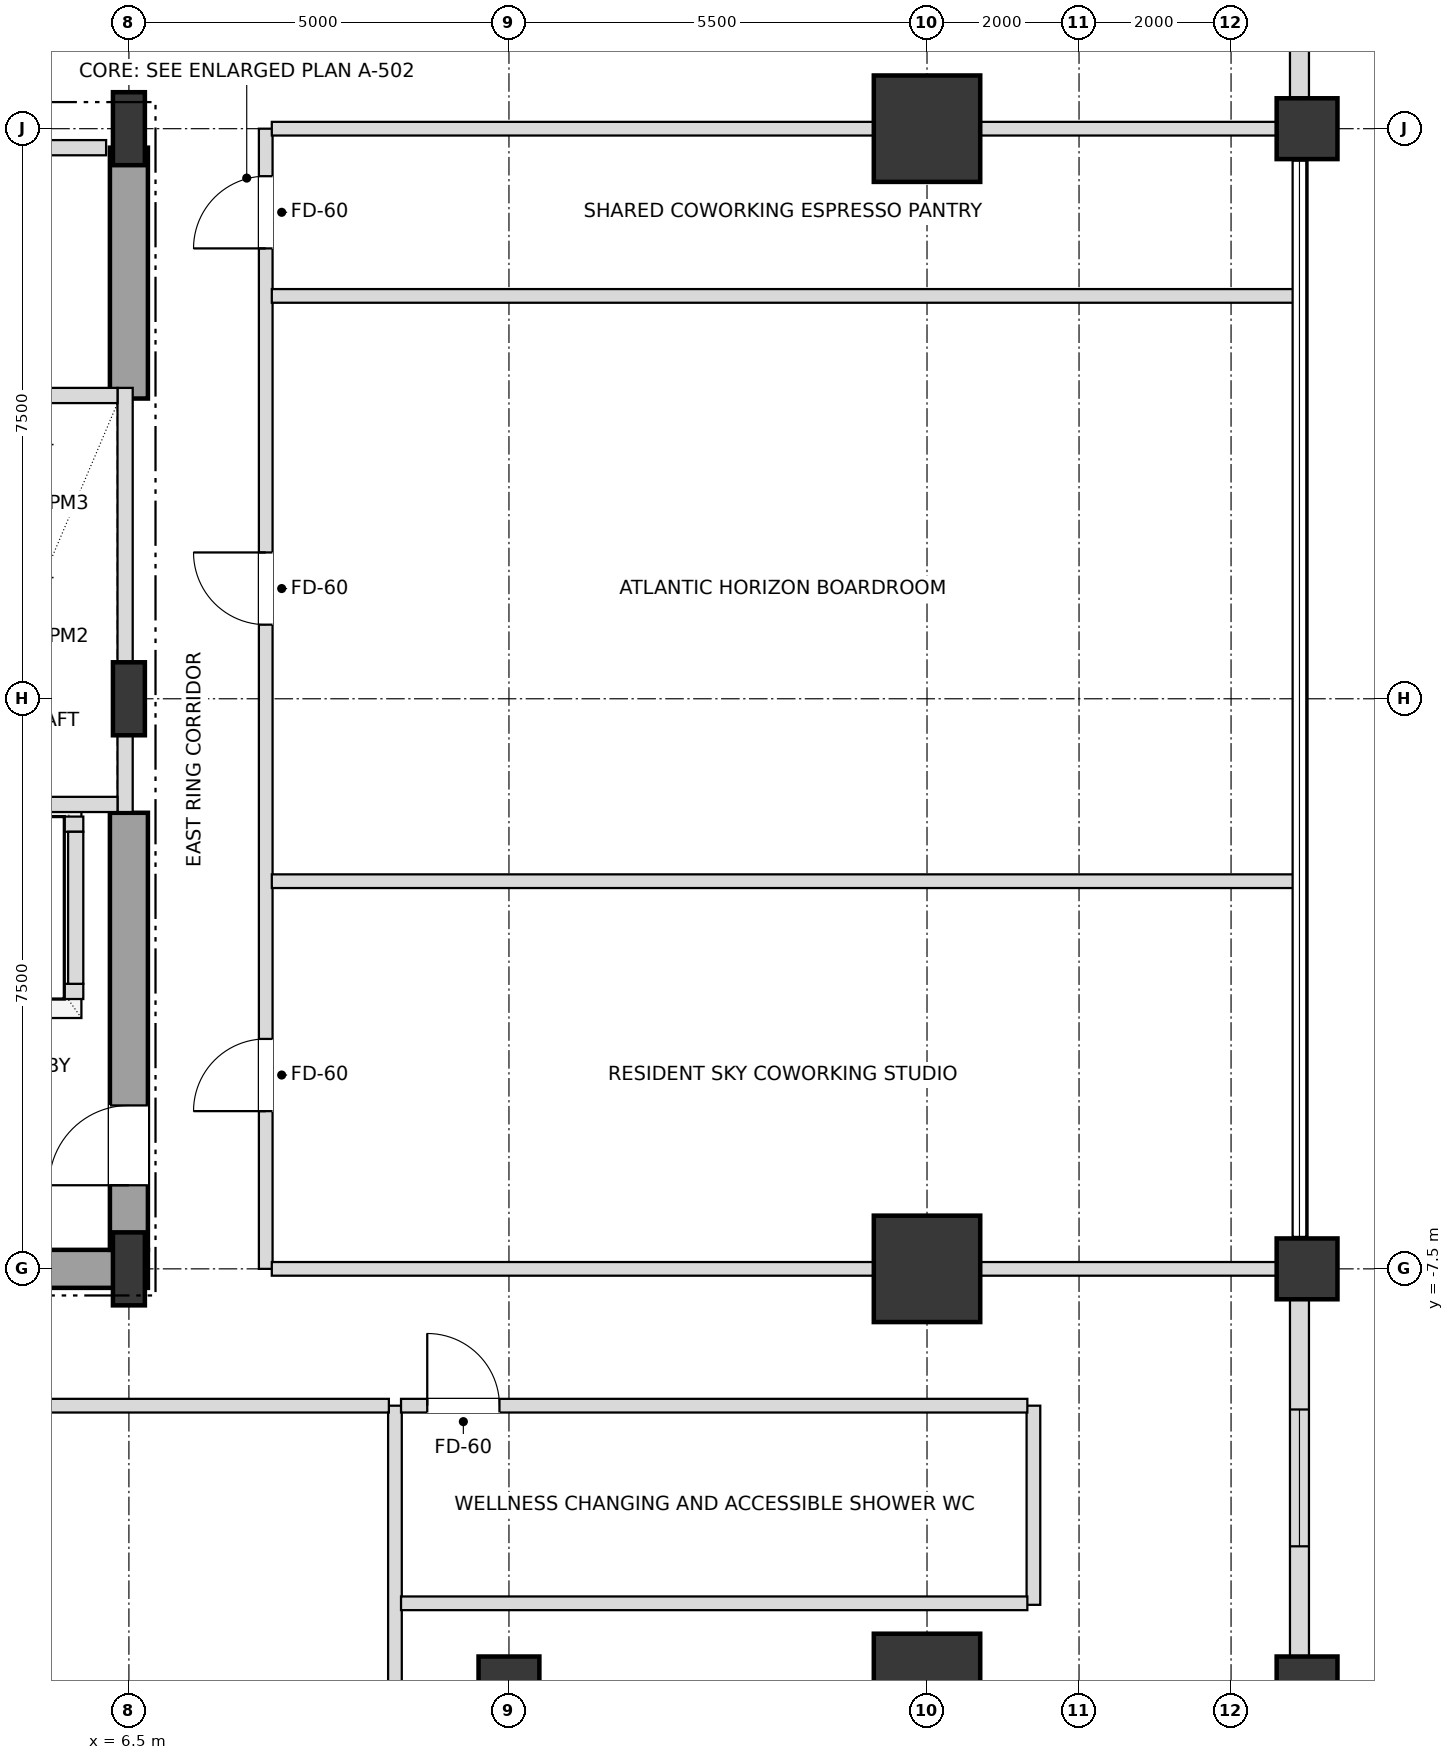
"""IFC4 building model, lengths in metres.
Left out: names, types, materials, properties, quantities, classifications, styles, units other than length and angle.
Written with IfcOpenShell. Run it as: python <this file> out.ifc"""

import sys

from ifc_helpers import new_model, si_unit, direction, frame, frame_2d, origin, origin_2d, place, context, subcontext, project, spatial, rectangle, i_section, extrude, element, fill, save


model = new_model("IFC4")
c1 = context("Model", 3, precision=1e-05, world=origin(), true_north=direction((0.0, 1.0)))
c2 = subcontext(c1, "Body", "Model", "MODEL_VIEW")
j1 = project(units=[si_unit("LENGTHUNIT", "METRE"), si_unit("PLANEANGLEUNIT", "RADIAN")], contexts=[c1])
p1 = place(None, origin())
s1 = spatial("IfcSite", under=j1, at=p1, CompositionType="ELEMENT")
p2 = place(p1, origin())
s2 = spatial("IfcBuilding", under=s1, at=p2, CompositionType="ELEMENT")
p3 = place(p2, frame((0.0, 0.0, 79.2)))
s3 = spatial("IfcBuildingStorey", under=s2, at=p3, CompositionType="ELEMENT", Elevation=79.2)
for number, where, z_axis, x_axis in (
    (1, (6.5, -7.5, 0.0), (0.0, 0.0, 1.0), (1.0, 0.0, 0.0)),
    (2, (6.5, 0.0, 0.0), (0.0, 0.0, 1.0), (1.0, 0.0, 0.0)),
    (3, (6.5, 7.5, 0.0), (0.0, 0.0, 1.0), (1.0, 0.0, 0.0)),
):
    element("IfcColumn", number, at=place(p3, frame(where, z_axis=z_axis, x_axis=x_axis)), inside=s3, PredefinedType="COLUMN", context=c2, shape_type="SweptSolid", body=[
        extrude(i_section(OverallWidth=0.42, OverallDepth=0.96, WebThickness=0.022, FlangeThickness=0.034, at=origin_2d()), origin(), (0.0, 0.0, 1.0), 3.6),
    ])
for number, where, z_axis, x_axis in (
    (4, (17.0, -13.0, 0.0), (0.0, 0.0, 1.0), (1.0, 0.0, 0.0)),
    (5, (17.0, -7.5, 0.0), (0.0, 0.0, 1.0), (1.0, 0.0, 0.0)),
    (6, (17.0, 7.5, 0.0), (0.0, 0.0, 1.0), (1.0, 0.0, 0.0)),
):
    element("IfcColumn", number, at=place(p3, frame(where, z_axis=z_axis, x_axis=x_axis)), inside=s3, PredefinedType="USERDEFINED", context=c2, shape_type="SweptSolid", body=[
        extrude(rectangle(XDim=1.4, YDim=1.4, at=origin_2d()), origin(), (0.0, 0.0, 1.0), 3.6),
    ])
for number, where, z_axis, x_axis in (
    (7, (11.5, -13.0, 0.0), (0.0, 0.0, 1.0), (1.0, 0.0, 0.0)),
    (8, (22.0, -13.0, 0.0), (0.0, 0.0, 1.0), (1.0, 0.0, 0.0)),
    (9, (22.0, -7.5, 0.0), (0.0, 0.0, 1.0), (1.0, 0.0, 0.0)),
    (10, (22.0, 7.5, 0.0), (0.0, 0.0, 1.0), (1.0, 0.0, 0.0)),
):
    element("IfcColumn", number, at=place(p3, frame(where, z_axis=z_axis, x_axis=x_axis)), inside=s3, PredefinedType="COLUMN", context=c2, shape_type="SweptSolid", body=[
        extrude(rectangle(XDim=0.8, YDim=0.8, at=origin_2d()), origin(), (0.0, 0.0, 1.0), 3.6),
    ])
p4 = place(p3, frame((21.9, -12.605, 0.0), z_axis=(0.0, 0.0, 1.0), x_axis=(0.0, 1.0, 0.0)))
e11 = element("IfcWall", 11, at=p4, inside=s3, PredefinedType="SOLIDWALL", context=c2, shape_type="SweptSolid", body=[
    extrude(rectangle(XDim=4.71, YDim=0.25, at=frame_2d((2.355, 0.0))), origin(), (0.0, 0.0, 1.0), 2.736),
])
p5 = place(p4, frame((1.455, 0.0, 0.72)))
e12 = element("IfcOpeningElement", 12, at=p5, cuts=e11, PredefinedType="OPENING", context=c2, shape_type="SweptSolid", body=[
    extrude(rectangle(XDim=1.8, YDim=1.68, at=frame_2d((0.9, 0.84))), frame((0.0, 0.135, 0.0), z_axis=(0.0, -1.0, 0.0), x_axis=(1.0, 0.0, 0.0)), (0.0, 0.0, 1.0), 0.27),
])
p6 = place(p3, frame((21.9, 7.895, 0.0), z_axis=(0.0, 0.0, 1.0), x_axis=(0.0, 1.0, 0.0)))
e13 = element("IfcWall", 13, at=p6, inside=s3, PredefinedType="SOLIDWALL", context=c2, shape_type="SweptSolid", body=[
    extrude(rectangle(XDim=4.71, YDim=0.25, at=frame_2d((2.355, 0.0))), origin(), (0.0, 0.0, 1.0), 2.736),
])
p7 = place(p6, frame((1.455, 0.0, 0.72)))
e14 = element("IfcOpeningElement", 14, at=p7, cuts=e13, PredefinedType="OPENING", context=c2, shape_type="SweptSolid", body=[
    extrude(rectangle(XDim=1.8, YDim=1.68, at=frame_2d((0.9, 0.84))), frame((0.0, 0.135, 0.0), z_axis=(0.0, -1.0, 0.0), x_axis=(1.0, 0.0, 0.0)), (0.0, 0.0, 1.0), 0.27),
])
p8 = place(p3, frame((0.0, -7.5, 0.0), z_axis=(0.0, 0.0, 1.0), x_axis=(1.0, 0.0, 0.0)))
e15 = element("IfcWall", 15, at=p8, inside=s3, PredefinedType="SHEAR", context=c2, shape_type="SweptSolid", body=[
    extrude(rectangle(XDim=6.75, YDim=0.5, at=frame_2d((3.375, 0.0))), origin(), (0.0, 0.0, 1.0), 3.38),
])
p9 = place(p3, frame((6.5, -7.25, 0.0), z_axis=(0.0, 0.0, 1.0), x_axis=(0.0, 1.0, 0.0)))
e16 = element("IfcWall", 16, at=p9, inside=s3, PredefinedType="SHEAR", context=c2, shape_type="SweptSolid", body=[
    extrude(rectangle(XDim=5.75, YDim=0.5, at=frame_2d((2.875, 0.0))), origin(), (0.0, 0.0, 1.0), 3.38),
])
p10 = place(p9, frame((0.85, 0.0, 0.0)))
e17 = element("IfcOpeningElement", 17, at=p10, cuts=e16, PredefinedType="OPENING", context=c2, shape_type="SweptSolid", body=[
    extrude(rectangle(XDim=1.05, YDim=2.15, at=frame_2d((0.525, 1.075))), frame((0.0, 0.26, 0.0), z_axis=(0.0, -1.0, 0.0), x_axis=(1.0, 0.0, 0.0)), (0.0, 0.0, 1.0), 0.52),
])
p11 = place(p3, frame((6.5, 3.95, 0.0), z_axis=(0.0, 0.0, 1.0), x_axis=(0.0, 1.0, 0.0)))
e18 = element("IfcWall", 18, at=p11, inside=s3, PredefinedType="SHEAR", context=c2, shape_type="SweptSolid", body=[
    extrude(rectangle(XDim=3.3, YDim=0.5, at=frame_2d((1.65, 0.0))), origin(), (0.0, 0.0, 1.0), 3.38),
])
p12 = place(p3, frame((6.45, -1.49, 0.0), z_axis=(0.0, 0.0, 1.0), x_axis=(0.0, 1.0, 0.0)))
e19 = element("IfcWall", 19, at=p12, inside=s3, PredefinedType="SOLIDWALL", context=c2, shape_type="SweptSolid", body=[
    extrude(rectangle(XDim=5.58, YDim=0.2, at=frame_2d((2.79, 0.0))), origin(), (0.0, 0.0, 1.0), 2.816),
])
for number, where, z_axis, x_axis in (
    (20, (4.15, -1.39, 0.0), (0.0, 0.0, 1.0), (1.0, 0.0, 0.0)),
    (21, (4.15, 3.99, 0.0), (0.0, 0.0, 1.0), (1.0, 0.0, 0.0)),
):
    element("IfcWall", number, at=place(p3, frame(where, z_axis=z_axis, x_axis=x_axis)), inside=s3, PredefinedType="SOLIDWALL", context=c2, shape_type="SweptSolid", body=[
        extrude(rectangle(XDim=2.2, YDim=0.2, at=frame_2d((1.1, 0.0))), origin(), (0.0, 0.0, 1.0), 3.38),
    ])
p13 = place(p3, frame((1.8, -3.85, 0.0), z_axis=(0.0, 0.0, 1.0), x_axis=(1.0, 0.0, 0.0)))
e22 = element("IfcWall", 22, at=p13, inside=s3, PredefinedType="SOLIDWALL", context=c2, shape_type="SweptSolid", body=[
    extrude(rectangle(XDim=4.1, YDim=0.2, at=frame_2d((2.05, 0.0))), origin(), (0.0, 0.0, 1.0), 3.38),
])
p14 = place(p13, frame((0.45, 0.0, 0.0)))
e23 = element("IfcOpeningElement", 23, at=p14, cuts=e22, PredefinedType="OPENING", context=c2, shape_type="SweptSolid", body=[
    extrude(rectangle(XDim=1.2, YDim=2.2, at=frame_2d((0.6, 1.1))), frame((0.0, 0.11, 0.0), z_axis=(0.0, -1.0, 0.0), x_axis=(1.0, 0.0, 0.0)), (0.0, 0.0, 1.0), 0.22),
])
p15 = place(p13, frame((2.45, 0.0, 0.0)))
e24 = element("IfcOpeningElement", 24, at=p15, cuts=e22, PredefinedType="OPENING", context=c2, shape_type="SweptSolid", body=[
    extrude(rectangle(XDim=1.2, YDim=2.2, at=frame_2d((0.6, 1.1))), frame((0.0, 0.11, 0.0), z_axis=(0.0, -1.0, 0.0), x_axis=(1.0, 0.0, 0.0)), (0.0, 0.0, 1.0), 0.22),
])
p16 = place(p3, frame((1.8, -1.65, 0.0), z_axis=(0.0, 0.0, 1.0), x_axis=(1.0, 0.0, 0.0)))
e25 = element("IfcWall", 25, at=p16, inside=s3, PredefinedType="SOLIDWALL", context=c2, shape_type="SweptSolid", body=[
    extrude(rectangle(XDim=4.1, YDim=0.2, at=frame_2d((2.05, 0.0))), origin(), (0.0, 0.0, 1.0), 3.38),
])
p17 = place(p3, frame((5.8, -3.75, 0.0), z_axis=(0.0, 0.0, 1.0), x_axis=(0.0, 1.0, 0.0)))
e26 = element("IfcWall", 26, at=p17, inside=s3, PredefinedType="SOLIDWALL", context=c2, shape_type="SweptSolid", body=[
    extrude(rectangle(XDim=2.0, YDim=0.2, at=frame_2d((1.0, 0.0))), origin(), (0.0, 0.0, 1.0), 3.38),
])
p18 = place(p3, frame((8.3, -7.5, 0.0), z_axis=(0.0, 0.0, 1.0), x_axis=(0.0, 1.0, 0.0)))
e27 = element("IfcWall", 27, at=p18, inside=s3, PredefinedType="PARTITIONING", context=c2, shape_type="SweptSolid", body=[
    extrude(rectangle(XDim=15.0, YDim=0.18, at=frame_2d((7.5, 0.0))), origin(), (0.0, 0.0, 1.0), 3.38),
])
p19 = place(p18, frame((2.075, 0.0, 0.0)))
e28 = element("IfcOpeningElement", 28, at=p19, cuts=e27, PredefinedType="OPENING", context=c2, shape_type="SweptSolid", body=[
    extrude(rectangle(XDim=0.95, YDim=2.15, at=frame_2d((0.475, 1.075))), frame((0.0, 0.1, 0.0), z_axis=(0.0, -1.0, 0.0), x_axis=(1.0, 0.0, 0.0)), (0.0, 0.0, 1.0), 0.2),
])
p20 = place(p18, frame((8.475, 0.0, 0.0)))
e29 = element("IfcOpeningElement", 29, at=p20, cuts=e27, PredefinedType="OPENING", context=c2, shape_type="SweptSolid", body=[
    extrude(rectangle(XDim=0.95, YDim=2.15, at=frame_2d((0.475, 1.075))), frame((0.0, 0.1, 0.0), z_axis=(0.0, -1.0, 0.0), x_axis=(1.0, 0.0, 0.0)), (0.0, 0.0, 1.0), 0.2),
])
p21 = place(p18, frame((13.425, 0.0, 0.0)))
e30 = element("IfcOpeningElement", 30, at=p21, cuts=e27, PredefinedType="OPENING", context=c2, shape_type="SweptSolid", body=[
    extrude(rectangle(XDim=0.95, YDim=2.15, at=frame_2d((0.475, 1.075))), frame((0.0, 0.1, 0.0), z_axis=(0.0, -1.0, 0.0), x_axis=(1.0, 0.0, 0.0)), (0.0, 0.0, 1.0), 0.2),
])
p22 = place(p3, frame((10.0, -24.9, 0.0), z_axis=(0.0, 0.0, 1.0), x_axis=(0.0, 1.0, 0.0)))
e31 = element("IfcWall", 31, at=p22, inside=s3, PredefinedType="PARTITIONING", context=c2, shape_type="SweptSolid", body=[
    extrude(rectangle(XDim=15.6, YDim=0.18, at=frame_2d((7.8, 0.0))), origin(), (0.0, 0.0, 1.0), 2.816),
])
p23 = place(p22, frame((6.015, 0.0, 0.0)))
e32 = element("IfcOpeningElement", 32, at=p23, cuts=e31, PredefinedType="OPENING", context=c2, shape_type="SweptSolid", body=[
    extrude(rectangle(XDim=0.95, YDim=2.15, at=frame_2d((0.475, 1.075))), frame((0.0, 0.1, 0.0), z_axis=(0.0, -1.0, 0.0), x_axis=(1.0, 0.0, 0.0)), (0.0, 0.0, 1.0), 0.2),
])
p24 = place(p3, frame((18.4, -11.92, 0.0), z_axis=(0.0, 0.0, 1.0), x_axis=(0.0, 1.0, 0.0)))
e33 = element("IfcWall", 33, at=p24, inside=s3, PredefinedType="PARTITIONING", context=c2, shape_type="SweptSolid", body=[
    extrude(rectangle(XDim=2.62, YDim=0.18, at=frame_2d((1.31, 0.0))), origin(), (0.0, 0.0, 1.0), 3.38),
])
p25 = place(p3, frame((10.08, -11.9, 0.0), z_axis=(0.0, 0.0, 1.0), x_axis=(1.0, 0.0, 0.0)))
e34 = element("IfcWall", 34, at=p25, inside=s3, PredefinedType="PARTITIONING", context=c2, shape_type="SweptSolid", body=[
    extrude(rectangle(XDim=8.24, YDim=0.18, at=frame_2d((4.12, 0.0))), origin(), (0.0, 0.0, 1.0), 2.816),
])
p26 = place(p3, frame((-2.87, -9.3, 0.0), z_axis=(0.0, 0.0, 1.0), x_axis=(1.0, 0.0, 0.0)))
e35 = element("IfcWall", 35, at=p26, inside=s3, PredefinedType="PARTITIONING", context=c2, shape_type="SweptSolid", body=[
    extrude(rectangle(XDim=12.79, YDim=0.18, at=frame_2d((6.395, 0.0))), origin(), (0.0, 0.0, 1.0), 2.816),
])
p27 = place(p26, frame((5.925, 0.0, 0.0)))
e36 = element("IfcOpeningElement", 36, at=p27, cuts=e35, PredefinedType="OPENING", context=c2, shape_type="SweptSolid", body=[
    extrude(rectangle(XDim=0.95, YDim=2.15, at=frame_2d((0.475, 1.075))), frame((0.0, 0.1, 0.0), z_axis=(0.0, -1.0, 0.0), x_axis=(1.0, 0.0, 0.0)), (0.0, 0.0, 1.0), 0.2),
])
p28 = place(p3, frame((10.08, -9.3, 0.0), z_axis=(0.0, 0.0, 1.0), x_axis=(1.0, 0.0, 0.0)))
e37 = element("IfcWall", 37, at=p28, inside=s3, PredefinedType="PARTITIONING", context=c2, shape_type="SweptSolid", body=[
    extrude(rectangle(XDim=8.24, YDim=0.18, at=frame_2d((4.12, 0.0))), origin(), (0.0, 0.0, 1.0), 2.816),
])
p29 = place(p28, frame((0.345, 0.0, 0.0)))
e38 = element("IfcOpeningElement", 38, at=p29, cuts=e37, PredefinedType="OPENING", context=c2, shape_type="SweptSolid", body=[
    extrude(rectangle(XDim=0.95, YDim=2.15, at=frame_2d((0.475, 1.075))), frame((0.0, 0.1, 0.0), z_axis=(0.0, -1.0, 0.0), x_axis=(1.0, 0.0, 0.0)), (0.0, 0.0, 1.0), 0.2),
])
p30 = place(p3, frame((8.38, -7.5, 0.0), z_axis=(0.0, 0.0, 1.0), x_axis=(1.0, 0.0, 0.0)))
e39 = element("IfcWall", 39, at=p30, inside=s3, PredefinedType="PARTITIONING", context=c2, shape_type="SweptSolid", body=[
    extrude(rectangle(XDim=13.52, YDim=0.18, at=frame_2d((6.76, 0.0))), origin(), (0.0, 0.0, 1.0), 2.816),
])
for number, where, z_axis, x_axis in (
    (40, (8.38, -2.4, 0.0), (0.0, 0.0, 1.0), (1.0, 0.0, 0.0)),
    (41, (8.38, 5.3, 0.0), (0.0, 0.0, 1.0), (1.0, 0.0, 0.0)),
):
    element("IfcWall", number, at=place(p3, frame(where, z_axis=z_axis, x_axis=x_axis)), inside=s3, PredefinedType="PARTITIONING", context=c2, shape_type="SweptSolid", body=[
        extrude(rectangle(XDim=13.44, YDim=0.18, at=frame_2d((6.72, 0.0))), origin(), (0.0, 0.0, 1.0), 2.816),
    ])
p31 = place(p3, frame((4.13, 7.25, 0.0), z_axis=(0.0, 0.0, 1.0), x_axis=(1.0, 0.0, 0.0)))
e42 = element("IfcWall", 42, at=p31, inside=s3, PredefinedType="SOLIDWALL", context=c2, shape_type="SweptSolid", body=[
    extrude(rectangle(XDim=2.07, YDim=0.2, at=frame_2d((1.035, 0.0))), origin(), (0.0, 0.0, 1.0), 3.38),
])
p32 = place(p3, frame((8.38, 7.5, 0.0), z_axis=(0.0, 0.0, 1.0), x_axis=(1.0, 0.0, 0.0)))
e43 = element("IfcWall", 43, at=p32, inside=s3, PredefinedType="PARTITIONING", context=c2, shape_type="SweptSolid", body=[
    extrude(rectangle(XDim=13.52, YDim=0.18, at=frame_2d((6.76, 0.0))), origin(), (0.0, 0.0, 1.0), 2.816),
])
p33 = place(p5, origin())
e44 = element("IfcWindow", 44, at=p33, inside=s3, PartitioningType="SINGLE_PANEL", PredefinedType="WINDOW", context=c2, shape_type="SweptSolid", body=[
    extrude(rectangle(XDim=1.8, YDim=1.68, at=frame_2d((0.9, 0.84))), frame((0.0, 0.03, 0.0), z_axis=(0.0, -1.0, 0.0), x_axis=(1.0, 0.0, 0.0)), (0.0, 0.0, 1.0), 0.06),
])
fill(e12, e44)
p34 = place(p10, origin())
e45 = element("IfcDoor", 45, at=p34, inside=s3, OperationType="SINGLE_SWING_LEFT", PredefinedType="DOOR", context=c2, shape_type="SweptSolid", body=[
    extrude(rectangle(XDim=1.05, YDim=2.15, at=frame_2d((0.525, 1.075))), frame((0.0, 0.025, 0.0), z_axis=(0.0, -1.0, 0.0), x_axis=(1.0, 0.0, 0.0)), (0.0, 0.0, 1.0), 0.05),
])
fill(e17, e45)
p35 = place(p29, origin())
e46 = element("IfcDoor", 46, at=p35, inside=s3, OperationType="SINGLE_SWING_LEFT", PredefinedType="DOOR", context=c2, shape_type="SweptSolid", body=[
    extrude(rectangle(XDim=0.95, YDim=2.15, at=frame_2d((0.475, 1.075))), frame((0.0, 0.025, 0.0), z_axis=(0.0, -1.0, 0.0), x_axis=(1.0, 0.0, 0.0)), (0.0, 0.0, 1.0), 0.05),
])
fill(e38, e46)
p36 = place(p19, origin())
e47 = element("IfcDoor", 47, at=p36, inside=s3, OperationType="SINGLE_SWING_LEFT", PredefinedType="DOOR", context=c2, shape_type="SweptSolid", body=[
    extrude(rectangle(XDim=0.95, YDim=2.15, at=frame_2d((0.475, 1.075))), frame((0.0, 0.025, 0.0), z_axis=(0.0, -1.0, 0.0), x_axis=(1.0, 0.0, 0.0)), (0.0, 0.0, 1.0), 0.05),
])
fill(e28, e47)
p37 = place(p20, origin())
e48 = element("IfcDoor", 48, at=p37, inside=s3, OperationType="SINGLE_SWING_RIGHT", PredefinedType="DOOR", context=c2, shape_type="SweptSolid", body=[
    extrude(rectangle(XDim=0.95, YDim=2.15, at=frame_2d((0.475, 1.075))), frame((0.0, 0.025, 0.0), z_axis=(0.0, -1.0, 0.0), x_axis=(1.0, 0.0, 0.0)), (0.0, 0.0, 1.0), 0.05),
])
fill(e29, e48)
p38 = place(p21, origin())
e49 = element("IfcDoor", 49, at=p38, inside=s3, OperationType="SINGLE_SWING_LEFT", PredefinedType="DOOR", context=c2, shape_type="SweptSolid", body=[
    extrude(rectangle(XDim=0.95, YDim=2.15, at=frame_2d((0.475, 1.075))), frame((0.0, 0.025, 0.0), z_axis=(0.0, -1.0, 0.0), x_axis=(1.0, 0.0, 0.0)), (0.0, 0.0, 1.0), 0.05),
])
fill(e30, e49)
save(model, sys.argv[1])
